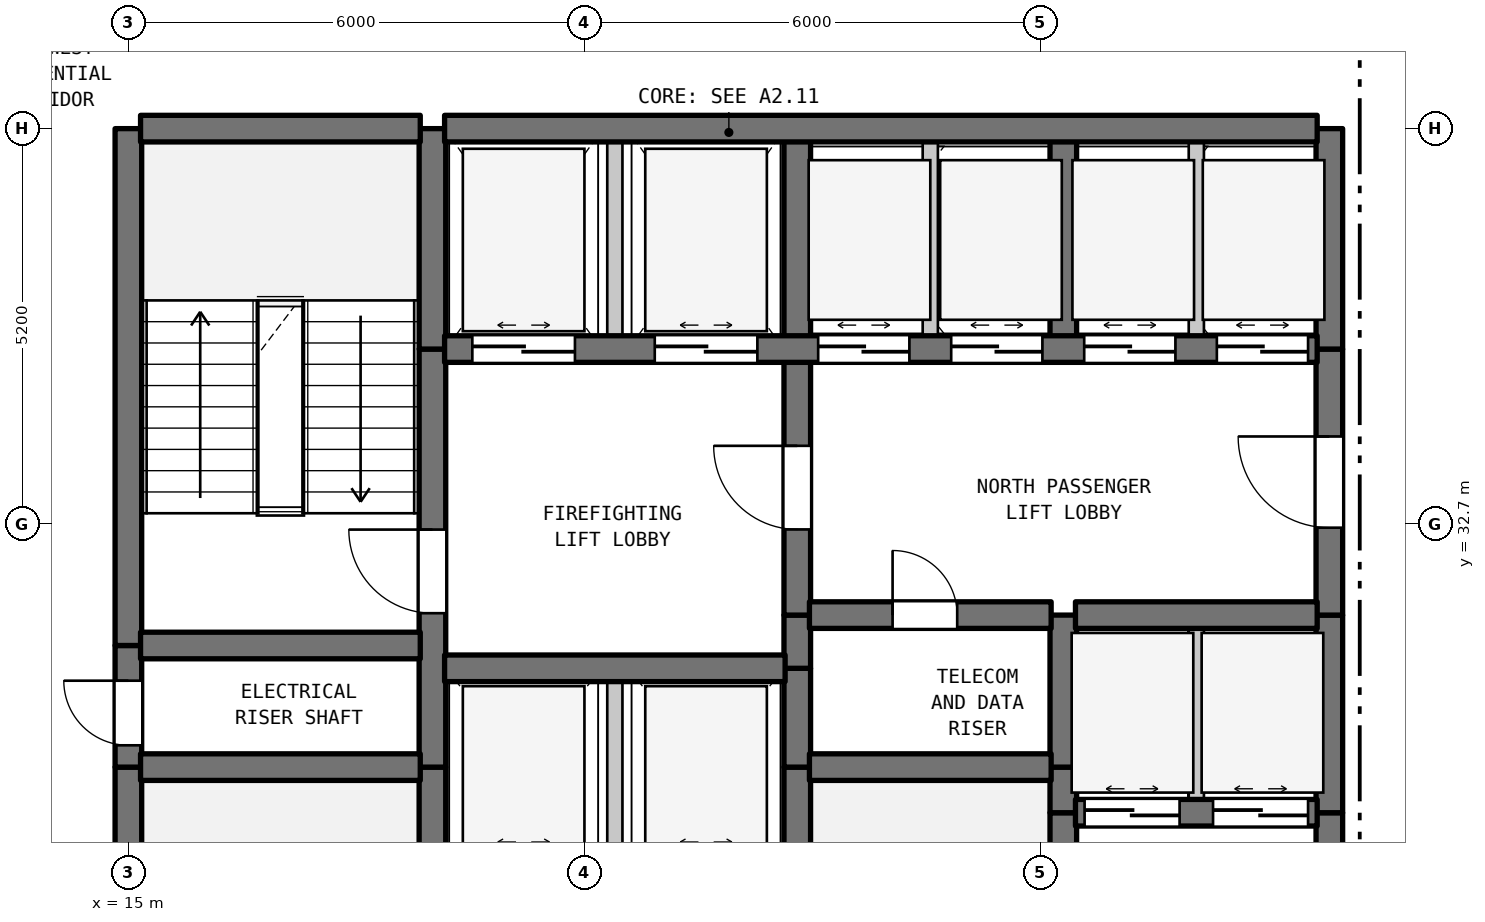
"""IFC4 building model, lengths in metres.
Left out: names, types, materials, properties, quantities, classifications, styles, units other than length and angle.
Written with IfcOpenShell. Run it as: python <this file> out.ifc"""

import sys

from ifc_helpers import new_model, si_unit, direction, frame, frame_2d, origin, place, context, subcontext, project, spatial, rectangle, extrude, element, fill, save


model = new_model("IFC4")
c1 = context("Model", 3, precision=1e-05, world=origin(), true_north=direction((0.0, 1.0)))
c2 = subcontext(c1, "Body", "Model", "MODEL_VIEW")
j1 = project(units=[si_unit("LENGTHUNIT", "METRE"), si_unit("PLANEANGLEUNIT", "RADIAN")], contexts=[c1])
p1 = place(None, origin())
s1 = spatial("IfcSite", under=j1, at=p1, CompositionType="ELEMENT")
p2 = place(p1, origin())
s2 = spatial("IfcBuilding", under=s1, at=p2, CompositionType="ELEMENT")
p3 = place(p2, frame((0.0, 0.0, 109.4)))
s3 = spatial("IfcBuildingStorey", under=s2, at=p3, CompositionType="ELEMENT", Elevation=109.4)
p4 = place(p3, frame((15.0, 22.7, 0.0), z_axis=(0.0, 0.0, 1.0), x_axis=(0.0, 1.0, 0.0)))
e1 = element("IfcWall", 1, at=p4, inside=s3, PredefinedType="SHEAR", context=c2, shape_type="SweptSolid", body=[
    extrude(rectangle(XDim=6.8, YDim=0.35, at=frame_2d((3.4, 0.0))), origin(), (0.0, 0.0, 1.0), 3.385),
])
p5 = place(p3, frame((15.0, 29.5, 0.0), z_axis=(0.0, 0.0, 1.0), x_axis=(0.0, 1.0, 0.0)))
e2 = element("IfcWall", 2, at=p5, inside=s3, PredefinedType="SHEAR", context=c2, shape_type="SweptSolid", body=[
    extrude(rectangle(XDim=1.6, YDim=0.35, at=frame_2d((0.8, 0.0))), origin(), (0.0, 0.0, 1.0), 3.385),
])
p6 = place(p5, frame((0.287, 0.0, 0.0)))
e3 = element("IfcOpeningElement", 3, at=p6, cuts=e2, PredefinedType="OPENING", context=c2, shape_type="SweptSolid", body=[
    extrude(rectangle(XDim=0.85, YDim=2.1, at=frame_2d((0.425, 1.05))), frame((0.0, 0.185, 0.0), z_axis=(0.0, -1.0, 0.0), x_axis=(1.0, 0.0, 0.0)), (0.0, 0.0, 1.0), 0.37),
])
p7 = place(p3, frame((15.0, 31.1, 0.0), z_axis=(0.0, 0.0, 1.0), x_axis=(0.0, 1.0, 0.0)))
e4 = element("IfcWall", 4, at=p7, inside=s3, PredefinedType="SHEAR", context=c2, shape_type="SweptSolid", body=[
    extrude(rectangle(XDim=6.8, YDim=0.35, at=frame_2d((3.4, 0.0))), origin(), (0.0, 0.0, 1.0), 3.385),
])
p8 = place(p3, frame((19.0, 28.2, 0.0), z_axis=(0.0, 0.0, 1.0), x_axis=(0.0, 1.0, 0.0)))
e5 = element("IfcWall", 5, at=p8, inside=s3, PredefinedType="SHEAR", context=c2, shape_type="SweptSolid", body=[
    extrude(rectangle(XDim=1.3, YDim=0.35, at=frame_2d((0.65, 0.0))), origin(), (0.0, 0.0, 1.0), 3.385),
])
p9 = place(p3, frame((19.0, 29.5, 0.0), z_axis=(0.0, 0.0, 1.0), x_axis=(0.0, 1.0, 0.0)))
e6 = element("IfcWall", 6, at=p9, inside=s3, PredefinedType="SHEAR", context=c2, shape_type="SweptSolid", body=[
    extrude(rectangle(XDim=5.5, YDim=0.35, at=frame_2d((2.75, 0.0))), origin(), (0.0, 0.0, 1.0), 3.385),
])
p10 = place(p9, frame((2.025, 0.0, 0.0)))
e7 = element("IfcOpeningElement", 7, at=p10, cuts=e6, PredefinedType="OPENING", context=c2, shape_type="SweptSolid", body=[
    extrude(rectangle(XDim=1.1, YDim=2.15, at=frame_2d((0.55, 1.075))), frame((0.0, 0.185, 0.0), z_axis=(0.0, -1.0, 0.0), x_axis=(1.0, 0.0, 0.0)), (0.0, 0.0, 1.0), 0.37),
])
p11 = place(p3, frame((19.0, 35.0, 0.0), z_axis=(0.0, 0.0, 1.0), x_axis=(0.0, 1.0, 0.0)))
e8 = element("IfcWall", 8, at=p11, inside=s3, PredefinedType="SHEAR", context=c2, shape_type="SweptSolid", body=[
    extrude(rectangle(XDim=2.9, YDim=0.35, at=frame_2d((1.45, 0.0))), origin(), (0.0, 0.0, 1.0), 3.385),
])
p12 = place(p3, frame((21.4, 28.2, 0.0), z_axis=(0.0, 0.0, 1.0), x_axis=(0.0, 1.0, 0.0)))
e9 = element("IfcWall", 9, at=p12, inside=s3, PredefinedType="STANDARD", context=c2, shape_type="SweptSolid", body=[
    extrude(rectangle(XDim=2.6, YDim=0.2, at=frame_2d((1.3, 0.0))), origin(), (0.0, 0.0, 1.0), 3.385),
])
p13 = place(p3, frame((21.4, 35.0, 0.0), z_axis=(0.0, 0.0, 1.0), x_axis=(0.0, 1.0, 0.0)))
e10 = element("IfcWall", 10, at=p13, inside=s3, PredefinedType="STANDARD", context=c2, shape_type="SweptSolid", body=[
    extrude(rectangle(XDim=2.9, YDim=0.2, at=frame_2d((1.45, 0.0))), origin(), (0.0, 0.0, 1.0), 3.385),
])
for number, where, z_axis, x_axis in (
    (11, (23.8, 28.2, 0.0), (0.0, 0.0, 1.0), (0.0, 1.0, 0.0)),
    (12, (23.8, 29.5, 0.0), (0.0, 0.0, 1.0), (0.0, 1.0, 0.0)),
):
    element("IfcWall", number, at=place(p3, frame(where, z_axis=z_axis, x_axis=x_axis)), inside=s3, PredefinedType="SHEAR", context=c2, shape_type="SweptSolid", body=[
        extrude(rectangle(XDim=1.3, YDim=0.35, at=frame_2d((0.65, 0.0))), origin(), (0.0, 0.0, 1.0), 3.385),
    ])
p14 = place(p3, frame((23.8, 30.8, 0.0), z_axis=(0.0, 0.0, 1.0), x_axis=(0.0, 1.0, 0.0)))
e13 = element("IfcWall", 13, at=p14, inside=s3, PredefinedType="SHEAR", context=c2, shape_type="SweptSolid", body=[
    extrude(rectangle(XDim=0.7, YDim=0.35, at=frame_2d((0.35, 0.0))), origin(), (0.0, 0.0, 1.0), 3.385),
])
p15 = place(p3, frame((23.8, 31.5, 0.0), z_axis=(0.0, 0.0, 1.0), x_axis=(0.0, 1.0, 0.0)))
e14 = element("IfcWall", 14, at=p15, inside=s3, PredefinedType="SHEAR", context=c2, shape_type="SweptSolid", body=[
    extrude(rectangle(XDim=3.5, YDim=0.35, at=frame_2d((1.75, 0.0))), origin(), (0.0, 0.0, 1.0), 3.385),
])
p16 = place(p15, frame((1.127, 0.0, 0.0)))
e15 = element("IfcOpeningElement", 15, at=p16, cuts=e14, PredefinedType="OPENING", context=c2, shape_type="SweptSolid", body=[
    extrude(rectangle(XDim=1.1, YDim=2.15, at=frame_2d((0.55, 1.075))), frame((0.0, 0.185, 0.0), z_axis=(0.0, -1.0, 0.0), x_axis=(1.0, 0.0, 0.0)), (0.0, 0.0, 1.0), 0.37),
])
p17 = place(p3, frame((23.8, 35.0, 0.0), z_axis=(0.0, 0.0, 1.0), x_axis=(0.0, 1.0, 0.0)))
e16 = element("IfcWall", 16, at=p17, inside=s3, PredefinedType="SHEAR", context=c2, shape_type="SweptSolid", body=[
    extrude(rectangle(XDim=2.9, YDim=0.35, at=frame_2d((1.45, 0.0))), origin(), (0.0, 0.0, 1.0), 3.385),
])
p18 = place(p3, frame((25.55, 35.0, 0.0), z_axis=(0.0, 0.0, 1.0), x_axis=(0.0, 1.0, 0.0)))
e17 = element("IfcWall", 17, at=p18, inside=s3, PredefinedType="STANDARD", context=c2, shape_type="SweptSolid", body=[
    extrude(rectangle(XDim=2.9, YDim=0.2, at=frame_2d((1.45, 0.0))), origin(), (0.0, 0.0, 1.0), 3.385),
])
p19 = place(p3, frame((27.3, 25.6, 0.0), z_axis=(0.0, 0.0, 1.0), x_axis=(0.0, 1.0, 0.0)))
e18 = element("IfcWall", 18, at=p19, inside=s3, PredefinedType="SHEAR", context=c2, shape_type="SweptSolid", body=[
    extrude(rectangle(XDim=3.3, YDim=0.35, at=frame_2d((1.65, 0.0))), origin(), (0.0, 0.0, 1.0), 3.385),
])
p20 = place(p3, frame((27.3, 28.9, 0.0), z_axis=(0.0, 0.0, 1.0), x_axis=(0.0, 1.0, 0.0)))
e19 = element("IfcWall", 19, at=p20, inside=s3, PredefinedType="SHEAR", context=c2, shape_type="SweptSolid", body=[
    extrude(rectangle(XDim=0.6, YDim=0.35, at=frame_2d((0.3, 0.0))), origin(), (0.0, 0.0, 1.0), 3.385),
])
p21 = place(p3, frame((27.3, 29.5, 0.0), z_axis=(0.0, 0.0, 1.0), x_axis=(0.0, 1.0, 0.0)))
e20 = element("IfcWall", 20, at=p21, inside=s3, PredefinedType="SHEAR", context=c2, shape_type="SweptSolid", body=[
    extrude(rectangle(XDim=2.0, YDim=0.35, at=frame_2d((1.0, 0.0))), origin(), (0.0, 0.0, 1.0), 3.385),
])
p22 = place(p3, frame((27.3, 35.0, 0.0), z_axis=(0.0, 0.0, 1.0), x_axis=(0.0, 1.0, 0.0)))
e21 = element("IfcWall", 21, at=p22, inside=s3, PredefinedType="SHEAR", context=c2, shape_type="SweptSolid", body=[
    extrude(rectangle(XDim=2.9, YDim=0.35, at=frame_2d((1.45, 0.0))), origin(), (0.0, 0.0, 1.0), 3.385),
])
p23 = place(p3, frame((29.05, 28.9, 0.0), z_axis=(0.0, 0.0, 1.0), x_axis=(0.0, 1.0, 0.0)))
e22 = element("IfcWall", 22, at=p23, inside=s3, PredefinedType="STANDARD", context=c2, shape_type="SweptSolid", body=[
    extrude(rectangle(XDim=2.6, YDim=0.2, at=frame_2d((1.3, 0.0))), origin(), (0.0, 0.0, 1.0), 3.385),
])
p24 = place(p3, frame((29.05, 35.0, 0.0), z_axis=(0.0, 0.0, 1.0), x_axis=(0.0, 1.0, 0.0)))
e23 = element("IfcWall", 23, at=p24, inside=s3, PredefinedType="STANDARD", context=c2, shape_type="SweptSolid", body=[
    extrude(rectangle(XDim=2.9, YDim=0.2, at=frame_2d((1.45, 0.0))), origin(), (0.0, 0.0, 1.0), 3.385),
])
p25 = place(p3, frame((30.8, 25.6, 0.0), z_axis=(0.0, 0.0, 1.0), x_axis=(0.0, 1.0, 0.0)))
e24 = element("IfcWall", 24, at=p25, inside=s3, PredefinedType="SHEAR", context=c2, shape_type="SweptSolid", body=[
    extrude(rectangle(XDim=3.3, YDim=0.35, at=frame_2d((1.65, 0.0))), origin(), (0.0, 0.0, 1.0), 3.385),
])
p26 = place(p25, frame((0.978, 0.0, 0.0)))
e25 = element("IfcOpeningElement", 25, at=p26, cuts=e24, PredefinedType="OPENING", context=c2, shape_type="SweptSolid", body=[
    extrude(rectangle(XDim=1.2, YDim=2.2, at=frame_2d((0.6, 1.1))), frame((0.0, 0.185, 0.0), z_axis=(0.0, -1.0, 0.0), x_axis=(1.0, 0.0, 0.0)), (0.0, 0.0, 1.0), 0.37),
])
p27 = place(p3, frame((30.8, 28.9, 0.0), z_axis=(0.0, 0.0, 1.0), x_axis=(0.0, 1.0, 0.0)))
e26 = element("IfcWall", 26, at=p27, inside=s3, PredefinedType="SHEAR", context=c2, shape_type="SweptSolid", body=[
    extrude(rectangle(XDim=2.6, YDim=0.35, at=frame_2d((1.3, 0.0))), origin(), (0.0, 0.0, 1.0), 3.385),
])
p28 = place(p3, frame((30.8, 31.5, 0.0), z_axis=(0.0, 0.0, 1.0), x_axis=(0.0, 1.0, 0.0)))
e27 = element("IfcWall", 27, at=p28, inside=s3, PredefinedType="SHEAR", context=c2, shape_type="SweptSolid", body=[
    extrude(rectangle(XDim=3.5, YDim=0.35, at=frame_2d((1.75, 0.0))), origin(), (0.0, 0.0, 1.0), 3.385),
])
p29 = place(p28, frame((1.15, 0.0, 0.0)))
e28 = element("IfcOpeningElement", 28, at=p29, cuts=e27, PredefinedType="OPENING", context=c2, shape_type="SweptSolid", body=[
    extrude(rectangle(XDim=1.2, YDim=2.2, at=frame_2d((0.6, 1.1))), frame((0.0, 0.185, 0.0), z_axis=(0.0, -1.0, 0.0), x_axis=(1.0, 0.0, 0.0)), (0.0, 0.0, 1.0), 0.37),
])
p30 = place(p3, frame((30.8, 35.0, 0.0), z_axis=(0.0, 0.0, 1.0), x_axis=(0.0, 1.0, 0.0)))
e29 = element("IfcWall", 29, at=p30, inside=s3, PredefinedType="SHEAR", context=c2, shape_type="SweptSolid", body=[
    extrude(rectangle(XDim=2.9, YDim=0.35, at=frame_2d((1.45, 0.0))), origin(), (0.0, 0.0, 1.0), 3.385),
])
p31 = place(p3, frame((27.46, 28.9, 0.0), z_axis=(0.0, 0.0, 1.0), x_axis=(1.0, 0.0, 0.0)))
e30 = element("IfcWall", 30, at=p31, inside=s3, PredefinedType="SHEAR", context=c2, shape_type="SweptSolid", body=[
    extrude(rectangle(XDim=3.18, YDim=0.35, at=frame_2d((1.59, 0.0))), origin(), (0.0, 0.0, 1.0), 3.385),
])
p32 = place(p31, frame((0.12, 0.0, 0.0)))
e31 = element("IfcOpeningElement", 31, at=p32, cuts=e30, PredefinedType="OPENING", context=c2, shape_type="SweptSolid", body=[
    extrude(rectangle(XDim=1.25, YDim=2.2, at=frame_2d((0.625, 1.1))), frame((0.0, 0.185, 0.0), z_axis=(0.0, -1.0, 0.0), x_axis=(1.0, 0.0, 0.0)), (0.0, 0.0, 1.0), 0.37),
])
p33 = place(p31, frame((1.81, 0.0, 0.0)))
e32 = element("IfcOpeningElement", 32, at=p33, cuts=e30, PredefinedType="OPENING", context=c2, shape_type="SweptSolid", body=[
    extrude(rectangle(XDim=1.25, YDim=2.2, at=frame_2d((0.625, 1.1))), frame((0.0, 0.185, 0.0), z_axis=(0.0, -1.0, 0.0), x_axis=(1.0, 0.0, 0.0)), (0.0, 0.0, 1.0), 0.37),
])
p34 = place(p3, frame((15.16, 29.5, 0.0), z_axis=(0.0, 0.0, 1.0), x_axis=(1.0, 0.0, 0.0)))
e33 = element("IfcWall", 33, at=p34, inside=s3, PredefinedType="SHEAR", context=c2, shape_type="SweptSolid", body=[
    extrude(rectangle(XDim=3.68, YDim=0.35, at=frame_2d((1.84, 0.0))), origin(), (0.0, 0.0, 1.0), 3.385),
])
p35 = place(p3, frame((23.96, 29.5, 0.0), z_axis=(0.0, 0.0, 1.0), x_axis=(1.0, 0.0, 0.0)))
e34 = element("IfcWall", 34, at=p35, inside=s3, PredefinedType="SHEAR", context=c2, shape_type="SweptSolid", body=[
    extrude(rectangle(XDim=3.18, YDim=0.35, at=frame_2d((1.59, 0.0))), origin(), (0.0, 0.0, 1.0), 3.385),
])
p36 = place(p3, frame((19.16, 30.8, 0.0), z_axis=(0.0, 0.0, 1.0), x_axis=(1.0, 0.0, 0.0)))
e35 = element("IfcWall", 35, at=p36, inside=s3, PredefinedType="SHEAR", context=c2, shape_type="SweptSolid", body=[
    extrude(rectangle(XDim=4.48, YDim=0.35, at=frame_2d((2.24, 0.0))), origin(), (0.0, 0.0, 1.0), 3.385),
])
p37 = place(p3, frame((15.16, 31.1, 0.0), z_axis=(0.0, 0.0, 1.0), x_axis=(1.0, 0.0, 0.0)))
e36 = element("IfcWall", 36, at=p37, inside=s3, PredefinedType="SHEAR", context=c2, shape_type="SweptSolid", body=[
    extrude(rectangle(XDim=3.68, YDim=0.35, at=frame_2d((1.84, 0.0))), origin(), (0.0, 0.0, 1.0), 3.385),
])
p38 = place(p3, frame((23.96, 31.5, 0.0), z_axis=(0.0, 0.0, 1.0), x_axis=(1.0, 0.0, 0.0)))
e37 = element("IfcWall", 37, at=p38, inside=s3, PredefinedType="SHEAR", context=c2, shape_type="SweptSolid", body=[
    extrude(rectangle(XDim=3.18, YDim=0.35, at=frame_2d((1.59, 0.0))), origin(), (0.0, 0.0, 1.0), 3.385),
])
p39 = place(p38, frame((1.094, 0.0, 0.0)))
e38 = element("IfcOpeningElement", 38, at=p39, cuts=e37, PredefinedType="OPENING", context=c2, shape_type="SweptSolid", body=[
    extrude(rectangle(XDim=0.85, YDim=2.1, at=frame_2d((0.425, 1.05))), frame((0.0, 0.185, 0.0), z_axis=(0.0, -1.0, 0.0), x_axis=(1.0, 0.0, 0.0)), (0.0, 0.0, 1.0), 0.37),
])
p40 = place(p3, frame((27.46, 31.5, 0.0), z_axis=(0.0, 0.0, 1.0), x_axis=(1.0, 0.0, 0.0)))
e39 = element("IfcWall", 39, at=p40, inside=s3, PredefinedType="SHEAR", context=c2, shape_type="SweptSolid", body=[
    extrude(rectangle(XDim=3.18, YDim=0.35, at=frame_2d((1.59, 0.0))), origin(), (0.0, 0.0, 1.0), 3.385),
])
p41 = place(p3, frame((19.16, 35.0, 0.0), z_axis=(0.0, 0.0, 1.0), x_axis=(1.0, 0.0, 0.0)))
e40 = element("IfcWall", 40, at=p41, inside=s3, PredefinedType="SHEAR", context=c2, shape_type="SweptSolid", body=[
    extrude(rectangle(XDim=11.48, YDim=0.35, at=frame_2d((5.74, 0.0))), origin(), (0.0, 0.0, 1.0), 3.385),
])
p42 = place(p41, frame((0.365, 0.0, 0.0)))
e41 = element("IfcOpeningElement", 41, at=p42, cuts=e40, PredefinedType="OPENING", context=c2, shape_type="SweptSolid", body=[
    extrude(rectangle(XDim=1.35, YDim=2.2, at=frame_2d((0.675, 1.1))), frame((0.0, 0.185, 0.0), z_axis=(0.0, -1.0, 0.0), x_axis=(1.0, 0.0, 0.0)), (0.0, 0.0, 1.0), 0.37),
])
p43 = place(p41, frame((2.765, 0.0, 0.0)))
e42 = element("IfcOpeningElement", 42, at=p43, cuts=e40, PredefinedType="OPENING", context=c2, shape_type="SweptSolid", body=[
    extrude(rectangle(XDim=1.35, YDim=2.2, at=frame_2d((0.675, 1.1))), frame((0.0, 0.185, 0.0), z_axis=(0.0, -1.0, 0.0), x_axis=(1.0, 0.0, 0.0)), (0.0, 0.0, 1.0), 0.37),
])
p44 = place(p41, frame((4.915, 0.0, 0.0)))
e43 = element("IfcOpeningElement", 43, at=p44, cuts=e40, PredefinedType="OPENING", context=c2, shape_type="SweptSolid", body=[
    extrude(rectangle(XDim=1.2, YDim=2.2, at=frame_2d((0.6, 1.1))), frame((0.0, 0.185, 0.0), z_axis=(0.0, -1.0, 0.0), x_axis=(1.0, 0.0, 0.0)), (0.0, 0.0, 1.0), 0.37),
])
p45 = place(p41, frame((6.665, 0.0, 0.0)))
e44 = element("IfcOpeningElement", 44, at=p45, cuts=e40, PredefinedType="OPENING", context=c2, shape_type="SweptSolid", body=[
    extrude(rectangle(XDim=1.2, YDim=2.2, at=frame_2d((0.6, 1.1))), frame((0.0, 0.185, 0.0), z_axis=(0.0, -1.0, 0.0), x_axis=(1.0, 0.0, 0.0)), (0.0, 0.0, 1.0), 0.37),
])
p46 = place(p41, frame((8.415, 0.0, 0.0)))
e45 = element("IfcOpeningElement", 45, at=p46, cuts=e40, PredefinedType="OPENING", context=c2, shape_type="SweptSolid", body=[
    extrude(rectangle(XDim=1.2, YDim=2.2, at=frame_2d((0.6, 1.1))), frame((0.0, 0.185, 0.0), z_axis=(0.0, -1.0, 0.0), x_axis=(1.0, 0.0, 0.0)), (0.0, 0.0, 1.0), 0.37),
])
p47 = place(p41, frame((10.16, 0.0, 0.0)))
e46 = element("IfcOpeningElement", 46, at=p47, cuts=e40, PredefinedType="OPENING", context=c2, shape_type="SweptSolid", body=[
    extrude(rectangle(XDim=1.2, YDim=2.2, at=frame_2d((0.6, 1.1))), frame((0.0, 0.185, 0.0), z_axis=(0.0, -1.0, 0.0), x_axis=(1.0, 0.0, 0.0)), (0.0, 0.0, 1.0), 0.37),
])
p48 = place(p3, frame((15.16, 37.9, 0.0), z_axis=(0.0, 0.0, 1.0), x_axis=(1.0, 0.0, 0.0)))
e47 = element("IfcWall", 47, at=p48, inside=s3, PredefinedType="SHEAR", context=c2, shape_type="SweptSolid", body=[
    extrude(rectangle(XDim=3.68, YDim=0.35, at=frame_2d((1.84, 0.0))), origin(), (0.0, 0.0, 1.0), 3.385),
])
p49 = place(p3, frame((19.16, 37.9, 0.0), z_axis=(0.0, 0.0, 1.0), x_axis=(1.0, 0.0, 0.0)))
e48 = element("IfcWall", 48, at=p49, inside=s3, PredefinedType="SHEAR", context=c2, shape_type="SweptSolid", body=[
    extrude(rectangle(XDim=11.48, YDim=0.35, at=frame_2d((5.74, 0.0))), origin(), (0.0, 0.0, 1.0), 3.385),
])
p50 = place(p6, origin())
e49 = element("IfcDoor", 49, at=p50, inside=s3, OperationType="SINGLE_SWING_RIGHT", PredefinedType="DOOR", context=c2, shape_type="SweptSolid", body=[
    extrude(rectangle(XDim=0.85, YDim=2.1, at=frame_2d((0.425, 1.05))), frame((0.0, 0.025, 0.0), z_axis=(0.0, -1.0, 0.0), x_axis=(1.0, 0.0, 0.0)), (0.0, 0.0, 1.0), 0.05),
])
fill(e3, e49)
p51 = place(p10, origin())
e50 = element("IfcDoor", 50, at=p51, inside=s3, OperationType="SINGLE_SWING_RIGHT", PredefinedType="DOOR", context=c2, shape_type="SweptSolid", body=[
    extrude(rectangle(XDim=1.1, YDim=2.15, at=frame_2d((0.55, 1.075))), frame((0.0, 0.025, 0.0), z_axis=(0.0, -1.0, 0.0), x_axis=(1.0, 0.0, 0.0)), (0.0, 0.0, 1.0), 0.05),
])
fill(e7, e50)
p52 = place(p16, origin())
e51 = element("IfcDoor", 51, at=p52, inside=s3, OperationType="SINGLE_SWING_RIGHT", PredefinedType="DOOR", context=c2, shape_type="SweptSolid", body=[
    extrude(rectangle(XDim=1.1, YDim=2.15, at=frame_2d((0.55, 1.075))), frame((0.0, 0.025, 0.0), z_axis=(0.0, -1.0, 0.0), x_axis=(1.0, 0.0, 0.0)), (0.0, 0.0, 1.0), 0.05),
])
fill(e15, e51)
p53 = place(p29, origin())
e52 = element("IfcDoor", 52, at=p53, inside=s3, OperationType="SINGLE_SWING_RIGHT", PredefinedType="DOOR", context=c2, shape_type="SweptSolid", body=[
    extrude(rectangle(XDim=1.2, YDim=2.2, at=frame_2d((0.6, 1.1))), frame((0.0, 0.025, 0.0), z_axis=(0.0, -1.0, 0.0), x_axis=(1.0, 0.0, 0.0)), (0.0, 0.0, 1.0), 0.05),
])
fill(e28, e52)
p54 = place(p32, origin())
e53 = element("IfcDoor", 53, at=p54, inside=s3, OperationType="DOUBLE_DOOR_SLIDING", PredefinedType="DOOR", context=c2, shape_type="SweptSolid", body=[
    extrude(rectangle(XDim=1.25, YDim=2.2, at=frame_2d((0.625, 1.1))), frame((0.0, 0.025, 0.0), z_axis=(0.0, -1.0, 0.0), x_axis=(1.0, 0.0, 0.0)), (0.0, 0.0, 1.0), 0.05),
])
fill(e31, e53)
p55 = place(p33, origin())
e54 = element("IfcDoor", 54, at=p55, inside=s3, OperationType="DOUBLE_DOOR_SLIDING", PredefinedType="DOOR", context=c2, shape_type="SweptSolid", body=[
    extrude(rectangle(XDim=1.25, YDim=2.2, at=frame_2d((0.625, 1.1))), frame((0.0, 0.025, 0.0), z_axis=(0.0, -1.0, 0.0), x_axis=(1.0, 0.0, 0.0)), (0.0, 0.0, 1.0), 0.05),
])
fill(e32, e54)
p56 = place(p39, origin())
e55 = element("IfcDoor", 55, at=p56, inside=s3, OperationType="SINGLE_SWING_LEFT", PredefinedType="DOOR", context=c2, shape_type="SweptSolid", body=[
    extrude(rectangle(XDim=0.85, YDim=2.1, at=frame_2d((0.425, 1.05))), frame((0.0, 0.025, 0.0), z_axis=(0.0, -1.0, 0.0), x_axis=(1.0, 0.0, 0.0)), (0.0, 0.0, 1.0), 0.05),
])
fill(e38, e55)
p57 = place(p42, origin())
e56 = element("IfcDoor", 56, at=p57, inside=s3, OperationType="DOUBLE_DOOR_SLIDING", PredefinedType="DOOR", context=c2, shape_type="SweptSolid", body=[
    extrude(rectangle(XDim=1.35, YDim=2.2, at=frame_2d((0.675, 1.1))), frame((0.0, 0.025, 0.0), z_axis=(0.0, -1.0, 0.0), x_axis=(1.0, 0.0, 0.0)), (0.0, 0.0, 1.0), 0.05),
])
fill(e41, e56)
p58 = place(p43, origin())
e57 = element("IfcDoor", 57, at=p58, inside=s3, OperationType="DOUBLE_DOOR_SLIDING", PredefinedType="DOOR", context=c2, shape_type="SweptSolid", body=[
    extrude(rectangle(XDim=1.35, YDim=2.2, at=frame_2d((0.675, 1.1))), frame((0.0, 0.025, 0.0), z_axis=(0.0, -1.0, 0.0), x_axis=(1.0, 0.0, 0.0)), (0.0, 0.0, 1.0), 0.05),
])
fill(e42, e57)
p59 = place(p44, origin())
e58 = element("IfcDoor", 58, at=p59, inside=s3, OperationType="DOUBLE_DOOR_SLIDING", PredefinedType="DOOR", context=c2, shape_type="SweptSolid", body=[
    extrude(rectangle(XDim=1.2, YDim=2.2, at=frame_2d((0.6, 1.1))), frame((0.0, 0.025, 0.0), z_axis=(0.0, -1.0, 0.0), x_axis=(1.0, 0.0, 0.0)), (0.0, 0.0, 1.0), 0.05),
])
fill(e43, e58)
p60 = place(p45, origin())
e59 = element("IfcDoor", 59, at=p60, inside=s3, OperationType="DOUBLE_DOOR_SLIDING", PredefinedType="DOOR", context=c2, shape_type="SweptSolid", body=[
    extrude(rectangle(XDim=1.2, YDim=2.2, at=frame_2d((0.6, 1.1))), frame((0.0, 0.025, 0.0), z_axis=(0.0, -1.0, 0.0), x_axis=(1.0, 0.0, 0.0)), (0.0, 0.0, 1.0), 0.05),
])
fill(e44, e59)
p61 = place(p46, origin())
e60 = element("IfcDoor", 60, at=p61, inside=s3, OperationType="DOUBLE_DOOR_SLIDING", PredefinedType="DOOR", context=c2, shape_type="SweptSolid", body=[
    extrude(rectangle(XDim=1.2, YDim=2.2, at=frame_2d((0.6, 1.1))), frame((0.0, 0.025, 0.0), z_axis=(0.0, -1.0, 0.0), x_axis=(1.0, 0.0, 0.0)), (0.0, 0.0, 1.0), 0.05),
])
fill(e45, e60)
p62 = place(p47, origin())
e61 = element("IfcDoor", 61, at=p62, inside=s3, OperationType="DOUBLE_DOOR_SLIDING", PredefinedType="DOOR", context=c2, shape_type="SweptSolid", body=[
    extrude(rectangle(XDim=1.2, YDim=2.2, at=frame_2d((0.6, 1.1))), frame((0.0, 0.025, 0.0), z_axis=(0.0, -1.0, 0.0), x_axis=(1.0, 0.0, 0.0)), (0.0, 0.0, 1.0), 0.05),
])
fill(e46, e61)
save(model, sys.argv[1])
